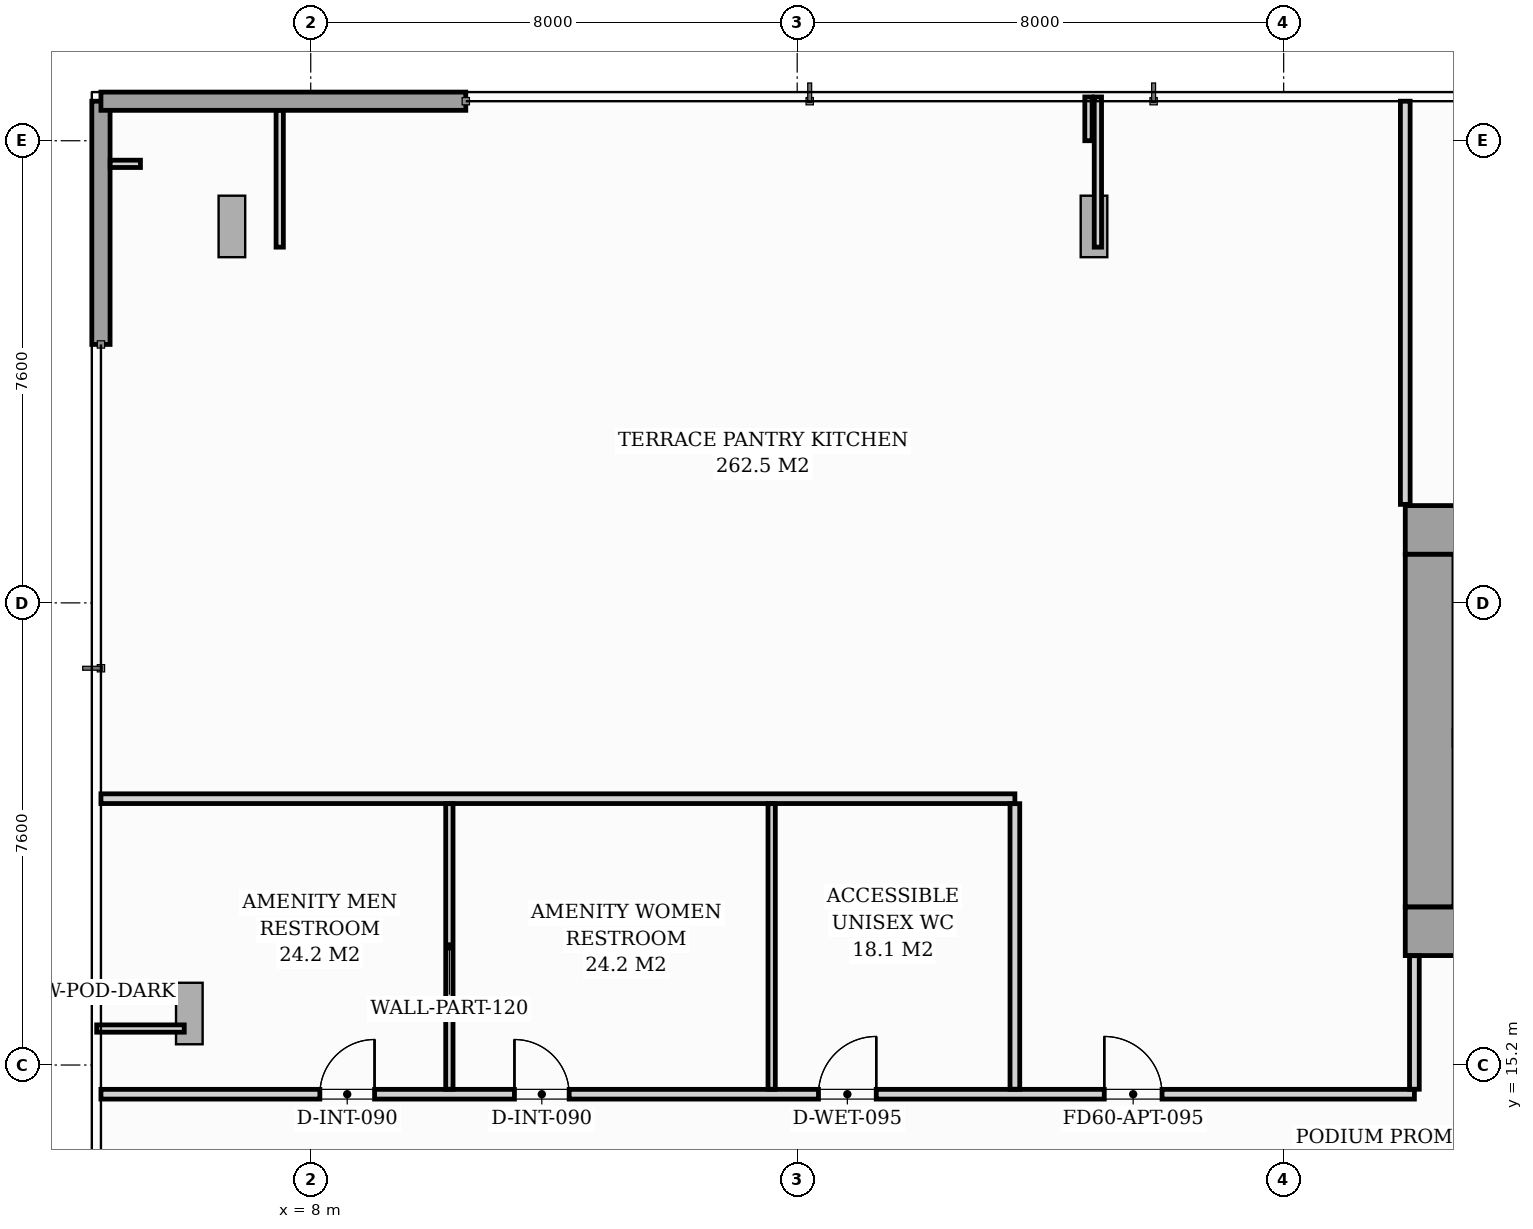
"""IFC4 building model, lengths in metres.
Left out: names, types, materials, properties, quantities, classifications, styles, units other than length and angle.
Written with IfcOpenShell. Run it as: python <this file> out.ifc"""

import sys

from ifc_helpers import new_model, si_unit, direction, frame, frame_2d, origin, origin_2d, place, context, subcontext, project, spatial, rectangle, i_section, extrude, source, transform, mapped, element, fill, save


model = new_model("IFC4")
c1 = context("Model", 3, precision=1e-05, world=origin(), true_north=direction((0.0, 1.0)))
c2 = subcontext(c1, "Body", "Model", "MODEL_VIEW")
j1 = project(units=[si_unit("LENGTHUNIT", "METRE"), si_unit("PLANEANGLEUNIT", "RADIAN")], contexts=[c1])
p1 = place(None, origin())
s1 = spatial("IfcSite", under=j1, at=p1, CompositionType="ELEMENT")
p2 = place(p1, origin())
s2 = spatial("IfcBuilding", under=s1, at=p2, CompositionType="ELEMENT")
p3 = place(p2, frame((0.0, 0.0, 18.5)))
s3 = spatial("IfcBuildingStorey", under=s2, at=p3, CompositionType="ELEMENT", Elevation=18.5)
m1 = source(origin(), c2, "Body", "SweptSolid", [
    extrude(i_section(OverallWidth=0.437, OverallDepth=0.514, WebThickness=0.061, FlangeThickness=0.097, FilletRadius=0.018, at=origin_2d()), origin(), (0.0, 0.0, 1.0), 4.496),
])
for number, where, z_axis, x_axis in (
    (1, (26.4, 17.4, 0.002), (0.0, 0.0, 1.0), (1.0, 0.0, 0.0)),
    (2, (26.4, 24.0, 0.002), (0.0, 0.0, 1.0), (1.0, 0.0, 0.0)),
):
    element("IfcColumn", number, at=place(p3, frame(where, z_axis=z_axis, x_axis=x_axis)), inside=s3, PredefinedType="PILASTER", context=c2, shape_type="MappedRepresentation", body=[
        mapped(m1, transform((0.0, 0.0, 0.0), scale=1.0)),
    ])
m2 = source(origin(), c2, "Body", "SweptSolid", [
    extrude(i_section(OverallWidth=0.438, OverallDepth=1.011, WebThickness=0.041, FlangeThickness=0.074, FilletRadius=0.024, at=origin_2d()), origin(), (0.0, 0.0, 1.0), 6.0),
])
p4 = place(p3, frame((5.752, 29.862, 0.184), z_axis=(0.579239248465, -0.530738743817, 0.618706941006), x_axis=(-0.456172820082, 0.417976837956, 0.785621869064)))
e3 = element("IfcColumn", 3, at=p4, inside=s3, PredefinedType="COLUMN", context=c2, shape_type="MappedRepresentation", body=[
    mapped(m2, transform((0.0, 0.0, 0.0), scale=1.0)),
])
m3 = source(origin(), c2, "Body", "SweptSolid", [
    extrude(i_section(OverallWidth=0.438, OverallDepth=1.011, WebThickness=0.041, FlangeThickness=0.074, FilletRadius=0.024, at=origin_2d()), origin(), (0.0, 0.0, 1.0), 4.976),
])
p5 = place(p3, frame((20.802, 29.887, 0.155), z_axis=(0.057550562464, -0.650031885833, 0.757724541083), x_axis=(-0.066823744097, 0.754772195689, 0.652574532019)))
e4 = element("IfcColumn", 4, at=p5, inside=s3, PredefinedType="COLUMN", context=c2, shape_type="MappedRepresentation", body=[
    mapped(m3, transform((0.0, 0.0, 0.0), scale=1.0)),
])
m4 = source(origin(), c2, "Body", "SweptSolid", [
    extrude(i_section(OverallWidth=0.438, OverallDepth=1.011, WebThickness=0.041, FlangeThickness=0.074, FilletRadius=0.024, at=origin_2d()), origin(), (0.0, 0.0, 1.0), 4.263),
])
p6 = place(p3, frame((5.616, 16.37, 0.103), z_axis=(0.320676507375, -0.26723996846, 0.908707530989), x_axis=(-0.69807824253, 0.581752648624, 0.417433375672)))
e5 = element("IfcColumn", 5, at=p6, inside=s3, PredefinedType="COLUMN", context=c2, shape_type="MappedRepresentation", body=[
    mapped(m4, transform((0.0, 0.0, 0.0), scale=1.0)),
])
p7 = place(p3, frame((4.55, 27.05, 0.0), z_axis=(0.0, 0.0, 1.0), x_axis=(0.0, 1.0, 0.0)))
e6 = element("IfcWall", 6, at=p7, inside=s3, PredefinedType="STANDARD", context=c2, shape_type="SweptSolid", body=[
    extrude(rectangle(XDim=4.0, YDim=0.3, at=frame_2d((2.0, 0.0))), origin(), (0.0, 0.0, 1.0), 4.08),
])
p8 = place(p3, frame((4.55, 31.05, 0.0), z_axis=(0.0, 0.0, 1.0), x_axis=(1.0, 0.0, 0.0)))
e7 = element("IfcWall", 7, at=p8, inside=s3, PredefinedType="STANDARD", context=c2, shape_type="SweptSolid", body=[
    extrude(rectangle(XDim=6.0, YDim=0.3, at=frame_2d((3.0, 0.0))), origin(), (0.0, 0.0, 1.0), 4.08),
])
p9 = place(p3, frame((26.0, 17.4, 0.0), z_axis=(0.0, 0.0, 1.0), x_axis=(1.0, 0.0, 0.0)))
e8 = element("IfcWall", 8, at=p9, inside=s3, PredefinedType="SHEAR", context=c2, shape_type="SweptSolid", body=[
    extrude(rectangle(XDim=20.0, YDim=0.8, at=frame_2d((10.0, 0.0))), origin(), (0.0, 0.0, 1.0), 4.5),
])
p10 = place(p9, frame((1.15, 0.0, 0.0)))
e9 = element("IfcOpeningElement", 9, at=p10, cuts=e8, PredefinedType="OPENING", context=c2, shape_type="SweptSolid", body=[
    extrude(rectangle(XDim=0.95, YDim=2.06, at=frame_2d((0.475, 1.03))), frame((0.0, 0.41, 0.0), z_axis=(0.0, -1.0, 0.0), x_axis=(1.0, 0.0, 0.0)), (0.0, 0.0, 1.0), 0.82),
])
p11 = place(p9, frame((9.58, 0.0, 0.0)))
e10 = element("IfcOpeningElement", 10, at=p11, cuts=e8, PredefinedType="OPENING", context=c2, shape_type="SweptSolid", body=[
    extrude(rectangle(XDim=0.9, YDim=2.06, at=frame_2d((0.45, 1.03))), frame((0.0, 0.41, 0.0), z_axis=(0.0, -1.0, 0.0), x_axis=(1.0, 0.0, 0.0)), (0.0, 0.0, 1.0), 0.82),
])
p12 = place(p9, frame((17.75, 0.0, 0.0)))
e11 = element("IfcOpeningElement", 11, at=p12, cuts=e8, PredefinedType="OPENING", context=c2, shape_type="SweptSolid", body=[
    extrude(rectangle(XDim=0.95, YDim=2.06, at=frame_2d((0.475, 1.03))), frame((0.0, 0.41, 0.0), z_axis=(0.0, -1.0, 0.0), x_axis=(1.0, 0.0, 0.0)), (0.0, 0.0, 1.0), 0.82),
])
p13 = place(p3, frame((26.0, 24.0, 0.0), z_axis=(0.0, 0.0, 1.0), x_axis=(1.0, 0.0, 0.0)))
e12 = element("IfcWall", 12, at=p13, inside=s3, PredefinedType="SHEAR", context=c2, shape_type="SweptSolid", body=[
    extrude(rectangle(XDim=20.0, YDim=0.8, at=frame_2d((10.0, 0.0))), origin(), (0.0, 0.0, 1.0), 4.5),
])
p14 = place(p3, frame((26.4, 17.802, 0.0), z_axis=(0.0, 0.0, 1.0), x_axis=(0.0, 1.0, 0.0)))
e13 = element("IfcWall", 13, at=p14, inside=s3, PredefinedType="SHEAR", context=c2, shape_type="SweptSolid", body=[
    extrude(rectangle(XDim=5.796, YDim=0.8, at=frame_2d((2.898, 0.0))), origin(), (0.0, 0.0, 1.0), 4.5),
])
p15 = place(p3, frame((4.55, 14.72, 0.0), z_axis=(0.0, 0.0, 1.0), x_axis=(1.0, 0.0, 0.0)))
e14 = element("IfcWall", 14, at=p15, inside=s3, PredefinedType="PARTITIONING", context=c2, shape_type="SweptSolid", body=[
    extrude(rectangle(XDim=21.6, YDim=0.16, at=frame_2d((10.8, 0.0))), origin(), (0.0, 0.0, 1.0), 4.08),
])
p16 = place(p15, frame((16.5, 0.0, 0.0)))
e15 = element("IfcOpeningElement", 15, at=p16, cuts=e14, PredefinedType="OPENING", context=c2, shape_type="SweptSolid", body=[
    extrude(rectangle(XDim=0.95, YDim=2.06, at=frame_2d((0.475, 1.03))), frame((0.0, 0.09, 0.0), z_axis=(0.0, -1.0, 0.0), x_axis=(1.0, 0.0, 0.0)), (0.0, 0.0, 1.0), 0.18),
])
p17 = place(p15, frame((3.6, 0.0, 0.0)))
e16 = element("IfcOpeningElement", 16, at=p17, cuts=e14, PredefinedType="OPENING", context=c2, shape_type="SweptSolid", body=[
    extrude(rectangle(XDim=0.9, YDim=2.05, at=frame_2d((0.45, 1.025))), frame((0.0, 0.09, 0.0), z_axis=(0.0, -1.0, 0.0), x_axis=(1.0, 0.0, 0.0)), (0.0, 0.0, 1.0), 0.18),
])
p18 = place(p15, frame((6.8, 0.0, 0.0)))
e17 = element("IfcOpeningElement", 17, at=p18, cuts=e14, PredefinedType="OPENING", context=c2, shape_type="SweptSolid", body=[
    extrude(rectangle(XDim=0.9, YDim=2.05, at=frame_2d((0.45, 1.025))), frame((0.0, 0.09, 0.0), z_axis=(0.0, -1.0, 0.0), x_axis=(1.0, 0.0, 0.0)), (0.0, 0.0, 1.0), 0.18),
])
p19 = place(p15, frame((11.8, 0.0, 0.0)))
e18 = element("IfcOpeningElement", 18, at=p19, cuts=e14, PredefinedType="OPENING", context=c2, shape_type="SweptSolid", body=[
    extrude(rectangle(XDim=0.95, YDim=2.1, at=frame_2d((0.475, 1.05))), frame((0.0, 0.09, 0.0), z_axis=(0.0, -1.0, 0.0), x_axis=(1.0, 0.0, 0.0)), (0.0, 0.0, 1.0), 0.18),
])
p20 = place(p3, frame((4.55, 19.58, 0.0), z_axis=(0.0, 0.0, 1.0), x_axis=(1.0, 0.0, 0.0)))
e19 = element("IfcWall", 19, at=p20, inside=s3, PredefinedType="PARTITIONING", context=c2, shape_type="SweptSolid", body=[
    extrude(rectangle(XDim=15.03, YDim=0.16, at=frame_2d((7.515, 0.0))), origin(), (0.0, 0.0, 1.0), 4.08),
])
for number, where, z_axis, x_axis in (
    (20, (10.28, 14.802, 0.0), (0.0, 0.0, 1.0), (0.0, 1.0, 0.0)),
    (21, (15.58, 14.802, 0.0), (0.0, 0.0, 1.0), (0.0, 1.0, 0.0)),
):
    element("IfcWall", number, at=place(p3, frame(where, z_axis=z_axis, x_axis=x_axis)), inside=s3, PredefinedType="PARTITIONING", context=c2, shape_type="SweptSolid", body=[
        extrude(rectangle(XDim=4.696, YDim=0.12, at=frame_2d((2.348, 0.0))), origin(), (0.0, 0.0, 1.0), 4.08),
    ])
p21 = place(p3, frame((19.58, 14.802, 0.0), z_axis=(0.0, 0.0, 1.0), x_axis=(0.0, 1.0, 0.0)))
e22 = element("IfcWall", 22, at=p21, inside=s3, PredefinedType="PARTITIONING", context=c2, shape_type="SweptSolid", body=[
    extrude(rectangle(XDim=4.696, YDim=0.16, at=frame_2d((2.348, 0.0))), origin(), (0.0, 0.0, 1.0), 3.185),
])
p22 = place(p3, frame((26.0, 24.42, 0.0), z_axis=(0.0, 0.0, 1.0), x_axis=(0.0, 1.0, 0.0)))
e23 = element("IfcWall", 23, at=p22, inside=s3, PredefinedType="PARTITIONING", context=c2, shape_type="SweptSolid", body=[
    extrude(rectangle(XDim=6.63, YDim=0.16, at=frame_2d((3.315, 0.0))), origin(), (0.0, 0.0, 1.0), 4.08),
])
p23 = place(p3, frame((26.15, 14.802, 0.0), z_axis=(0.0, 0.0, 1.0), x_axis=(0.0, 1.0, 0.0)))
e24 = element("IfcWall", 24, at=p23, inside=s3, PredefinedType="PARTITIONING", context=c2, shape_type="SweptSolid", body=[
    extrude(rectangle(XDim=2.196, YDim=0.16, at=frame_2d((1.098, 0.0))), origin(), (0.0, 0.0, 1.0), 4.08),
])
p24 = place(p3, frame((7.49, 28.65, 0.0), z_axis=(0.0, 0.0, 1.0), x_axis=(0.0, 1.0, 0.0)))
e25 = element("IfcWall", 25, at=p24, inside=s3, PredefinedType="PARTITIONING", context=c2, shape_type="SweptSolid", body=[
    extrude(rectangle(XDim=2.248, YDim=0.12, at=frame_2d((1.124, 0.0))), origin(), (0.0, 0.0, 1.0), 4.08),
])
p25 = place(p3, frame((20.945, 28.65, 0.0), z_axis=(0.0, 0.0, 1.0), x_axis=(0.0, 1.0, 0.0)))
e26 = element("IfcWall", 26, at=p25, inside=s3, PredefinedType="PARTITIONING", context=c2, shape_type="SweptSolid", body=[
    extrude(rectangle(XDim=2.47, YDim=0.12, at=frame_2d((1.235, 0.0))), origin(), (0.0, 0.0, 1.0), 4.08),
])
p26 = place(p3, frame((5.92, 15.8, 0.0), z_axis=(0.0, 0.0, 1.0), x_axis=(-1.0, 0.0, 0.0)))
e27 = element("IfcWall", 27, at=p26, inside=s3, PredefinedType="PARTITIONING", context=c2, shape_type="SweptSolid", body=[
    extrude(rectangle(XDim=1.44, YDim=0.12, at=frame_2d((0.72, 0.0))), origin(), (0.0, 0.0, 1.0), 4.08),
])
p27 = place(p3, frame((5.2, 30.02, 0.0), z_axis=(0.0, 0.0, 1.0), x_axis=(-1.0, 0.0, 0.0)))
e28 = element("IfcWall", 28, at=p27, inside=s3, PredefinedType="PARTITIONING", context=c2, shape_type="SweptSolid", body=[
    extrude(rectangle(XDim=0.498, YDim=0.12, at=frame_2d((0.249, 0.0))), origin(), (0.0, 0.0, 1.0), 4.08),
])
p28 = place(p3, frame((20.79, 30.4, 0.0), z_axis=(0.0, 0.0, 1.0), x_axis=(0.0, 1.0, 0.0)))
e29 = element("IfcWall", 29, at=p28, inside=s3, PredefinedType="PARTITIONING", context=c2, shape_type="SweptSolid", body=[
    extrude(rectangle(XDim=0.72, YDim=0.12, at=frame_2d((0.36, 0.0))), origin(), (0.0, 0.0, 1.0), 4.08),
])
p29 = place(p3, frame((5.2, 16.4, 0.0), z_axis=(0.0, 0.0, 1.0), x_axis=(-1.0, 0.0, 0.0)))
e30 = element("IfcWall", 30, at=p29, inside=s3, PredefinedType="PARTITIONING", context=c2, shape_type="SweptSolid", body=[
    extrude(rectangle(XDim=0.72, YDim=0.12, at=frame_2d((0.36, 0.0))), origin(), (0.0, 0.0, 1.0), 4.08),
])
m5 = source(origin(), c2, "Body", "SweptSolid", [
    extrude(rectangle(XDim=0.95, YDim=2.06, at=frame_2d((0.475, 1.03))), frame((0.0, 0.025, 0.0), z_axis=(0.0, -1.0, 0.0), x_axis=(1.0, 0.0, 0.0)), (0.0, 0.0, 1.0), 0.05),
])
p30 = place(p16, origin())
e31 = element("IfcDoor", 31, at=p30, inside=s3, OperationType="SINGLE_SWING_LEFT", PredefinedType="DOOR", context=c2, shape_type="MappedRepresentation", body=[
    mapped(m5, transform((0.0, 0.0, 0.0), scale=1.0)),
])
fill(e15, e31)
m6 = source(origin(), c2, "Body", "SweptSolid", [
    extrude(rectangle(XDim=0.9, YDim=2.05, at=frame_2d((0.45, 1.025))), frame((0.0, 0.025, 0.0), z_axis=(0.0, -1.0, 0.0), x_axis=(1.0, 0.0, 0.0)), (0.0, 0.0, 1.0), 0.05),
])
p31 = place(p17, origin())
e32 = element("IfcDoor", 32, at=p31, inside=s3, OperationType="SINGLE_SWING_RIGHT", PredefinedType="DOOR", context=c2, shape_type="MappedRepresentation", body=[
    mapped(m6, transform((0.0, 0.0, 0.0), scale=1.0)),
])
fill(e16, e32)
p32 = place(p18, origin())
e33 = element("IfcDoor", 33, at=p32, inside=s3, OperationType="SINGLE_SWING_LEFT", PredefinedType="DOOR", context=c2, shape_type="MappedRepresentation", body=[
    mapped(m6, transform((0.0, 0.0, 0.0), scale=1.0)),
])
fill(e17, e33)
m7 = source(origin(), c2, "Body", "SweptSolid", [
    extrude(rectangle(XDim=0.95, YDim=2.1, at=frame_2d((0.475, 1.05))), frame((0.0, 0.025, 0.0), z_axis=(0.0, -1.0, 0.0), x_axis=(1.0, 0.0, 0.0)), (0.0, 0.0, 1.0), 0.05),
])
p33 = place(p19, origin())
e34 = element("IfcDoor", 34, at=p33, inside=s3, OperationType="SINGLE_SWING_RIGHT", PredefinedType="DOOR", context=c2, shape_type="MappedRepresentation", body=[
    mapped(m7, transform((0.0, 0.0, 0.0), scale=1.0)),
])
fill(e18, e34)
save(model, sys.argv[1])
